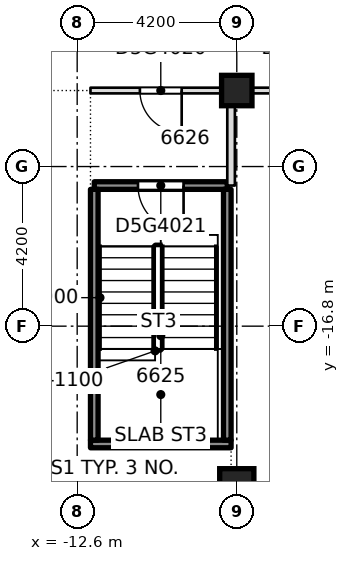
"""IFC4 building model, lengths in metres.
Left out: names, types, materials, properties, quantities, classifications, styles, units other than length and angle.
Written with IfcOpenShell. Run it as: python <this file> out.ifc"""

import sys

from ifc_helpers import new_model, si_unit, direction, frame, frame_2d, origin, origin_2d, place, context, subcontext, project, spatial, rectangle, extrude, element, fill, save


model = new_model("IFC4")
c1 = context("Model", 3, precision=1e-05, world=origin(), true_north=direction((0.0, 1.0)))
c2 = subcontext(c1, "Body", "Model", "MODEL_VIEW")
j1 = project(units=[si_unit("LENGTHUNIT", "METRE"), si_unit("PLANEANGLEUNIT", "RADIAN")], contexts=[c1])
p1 = place(None, origin())
s1 = spatial("IfcSite", under=j1, at=p1, CompositionType="ELEMENT")
p2 = place(p1, origin())
s2 = spatial("IfcBuilding", under=s1, at=p2, CompositionType="ELEMENT")
p3 = place(p2, frame((0.0, 0.0, 251.05)))
s3 = spatial("IfcBuildingStorey", under=s2, at=p3, CompositionType="ELEMENT", Elevation=251.05)
p4 = place(p3, frame((-8.4, -21.0, -0.4), z_axis=(0.0, 0.0, 1.0), x_axis=(1.0, 0.0, 0.0)))
e1 = element("IfcColumn", 1, at=p4, inside=s3, PredefinedType="COLUMN", context=c2, shape_type="SweptSolid", body=[
    extrude(rectangle(XDim=0.9, YDim=0.9, at=origin_2d()), origin(), (0.0, 0.0, 1.0), 3.45),
])
p5 = place(p3, frame((-8.4, -10.6, -0.4), z_axis=(0.0, 0.0, 1.0), x_axis=(1.0, 0.0, 0.0)))
e2 = element("IfcColumn", 2, at=p5, inside=s3, PredefinedType="COLUMN", context=c2, shape_type="SweptSolid", body=[
    extrude(rectangle(XDim=0.8, YDim=0.8, at=origin_2d()), origin(), (0.0, 0.0, 1.0), 3.45),
])
p6 = place(p3, frame((-12.15, -13.1, 0.0), z_axis=(0.0, 0.0, 1.0), x_axis=(1.0, 0.0, 0.0)))
e3 = element("IfcWall", 3, at=p6, inside=s3, PredefinedType="SOLIDWALL", context=c2, shape_type="SweptSolid", body=[
    extrude(rectangle(XDim=3.5, YDim=0.2, at=frame_2d((1.75, 0.0))), origin(), (0.0, 0.0, 1.0), 3.05),
])
p7 = place(p6, frame((1.15, 0.0, 0.0)))
e4 = element("IfcOpeningElement", 4, at=p7, cuts=e3, PredefinedType="OPENING", context=c2, shape_type="SweptSolid", body=[
    extrude(rectangle(XDim=1.2, YDim=2.1, at=frame_2d((0.6, 1.05))), frame((0.0, 0.11, 0.0), z_axis=(0.0, -1.0, 0.0), x_axis=(1.0, 0.0, 0.0)), (0.0, 0.0, 1.0), 0.22),
])
p8 = place(p3, frame((-12.25, -10.6, 0.0), z_axis=(0.0, 0.0, 1.0), x_axis=(1.0, 0.0, 0.0)))
e5 = element("IfcWall", 5, at=p8, inside=s3, PredefinedType="PARTITIONING", context=c2, shape_type="SweptSolid", body=[
    extrude(rectangle(XDim=7.75, YDim=0.15, at=frame_2d((3.875, 0.0))), origin(), (0.0, 0.0, 1.0), 3.05),
])
p9 = place(p8, frame((5.225, 0.0, 0.0)))
e6 = element("IfcOpeningElement", 6, at=p9, cuts=e5, PredefinedType="OPENING", context=c2, shape_type="SweptSolid", body=[
    extrude(rectangle(XDim=0.95, YDim=2.1, at=frame_2d((0.475, 1.05))), frame((0.0, 0.085, 0.0), z_axis=(0.0, -1.0, 0.0), x_axis=(1.0, 0.0, 0.0)), (0.0, 0.0, 1.0), 0.17),
])
p10 = place(p8, frame((1.3, 0.0, 0.0)))
e7 = element("IfcOpeningElement", 7, at=p10, cuts=e5, PredefinedType="OPENING", context=c2, shape_type="SweptSolid", body=[
    extrude(rectangle(XDim=1.1, YDim=2.1, at=frame_2d((0.55, 1.05))), frame((0.0, 0.085, 0.0), z_axis=(0.0, -1.0, 0.0), x_axis=(1.0, 0.0, 0.0)), (0.0, 0.0, 1.0), 0.17),
])
p11 = place(p3, frame((-8.55, -13.1, 0.0), z_axis=(0.0, 0.0, 1.0), x_axis=(0.0, 1.0, 0.0)))
e8 = element("IfcWall", 8, at=p11, inside=s3, PredefinedType="PARTITIONING", context=c2, shape_type="SweptSolid", body=[
    extrude(rectangle(XDim=2.425, YDim=0.2, at=frame_2d((1.212, 0.0))), origin(), (0.0, 0.0, 1.0), 3.05),
])
p12 = place(p3, frame((-12.25, -19.9, 0.0), z_axis=(0.0, 0.0, 1.0), x_axis=(1.0, 0.0, 0.0)))
e9 = element("IfcWall", 9, at=p12, inside=s3, PredefinedType="SOLIDWALL", context=c2, shape_type="SweptSolid", body=[
    extrude(rectangle(XDim=3.7, YDim=0.2, at=frame_2d((1.85, 0.0))), origin(), (0.0, 0.0, 1.0), 3.05),
])
for number, where, z_axis, x_axis in (
    (10, (-12.15, -19.8, 0.0), (0.0, 0.0, 1.0), (0.0, 1.0, 0.0)),
    (11, (-8.65, -19.8, 0.0), (0.0, 0.0, 1.0), (0.0, 1.0, 0.0)),
):
    element("IfcWall", number, at=place(p3, frame(where, z_axis=z_axis, x_axis=x_axis)), inside=s3, PredefinedType="SOLIDWALL", context=c2, shape_type="SweptSolid", body=[
        extrude(rectangle(XDim=6.6, YDim=0.2, at=frame_2d((3.3, 0.0))), origin(), (0.0, 0.0, 1.0), 3.05),
    ])
p13 = place(p10, origin())
e12 = element("IfcDoor", 12, at=p13, inside=s3, OperationType="SINGLE_SWING_RIGHT", PredefinedType="DOOR", context=c2, shape_type="SweptSolid", body=[
    extrude(rectangle(XDim=1.1, YDim=2.1, at=frame_2d((0.55, 1.05))), frame((0.0, 0.025, 0.0), z_axis=(0.0, -1.0, 0.0), x_axis=(1.0, 0.0, 0.0)), (0.0, 0.0, 1.0), 0.05),
])
fill(e7, e12)
p14 = place(p7, origin())
e13 = element("IfcDoor", 13, at=p14, inside=s3, OperationType="SINGLE_SWING_RIGHT", PredefinedType="DOOR", context=c2, shape_type="SweptSolid", body=[
    extrude(rectangle(XDim=1.2, YDim=2.1, at=frame_2d((0.6, 1.05))), frame((0.0, 0.025, 0.0), z_axis=(0.0, -1.0, 0.0), x_axis=(1.0, 0.0, 0.0)), (0.0, 0.0, 1.0), 0.05),
])
fill(e4, e13)
save(model, sys.argv[1])
